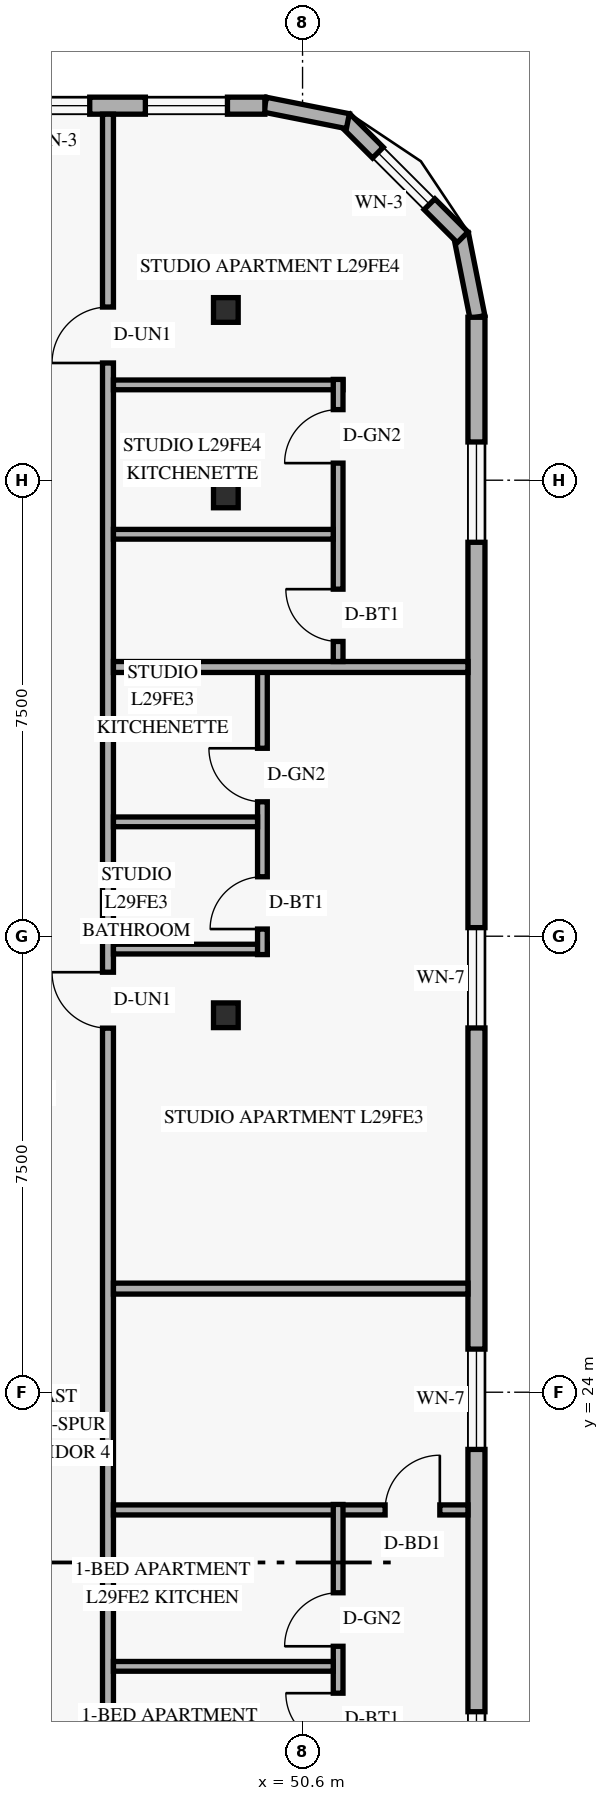
"""IFC4 building model, lengths in metres.
Left out: names, types, materials, properties, quantities, classifications, styles, units other than length and angle.
Written with IfcOpenShell. Run it as: python <this file> out.ifc"""

import sys

from ifc_helpers import new_model, si_unit, direction, frame, frame_2d, origin, origin_2d, place, context, subcontext, project, spatial, rectangle, hollow_rectangle, extrude, element, fill, save


model = new_model("IFC4")
c1 = context("Model", 3, precision=1e-05, world=origin(), true_north=direction((0.0, 1.0)))
c2 = subcontext(c1, "Body", "Model", "MODEL_VIEW")
j1 = project(units=[si_unit("LENGTHUNIT", "METRE"), si_unit("PLANEANGLEUNIT", "RADIAN")], contexts=[c1])
p1 = place(None, origin())
s1 = spatial("IfcSite", under=j1, at=p1, CompositionType="ELEMENT")
p2 = place(p1, origin())
s2 = spatial("IfcBuilding", under=s1, at=p2, CompositionType="ELEMENT")
p3 = place(p2, frame((0.0, 0.0, 113.4)))
s3 = spatial("IfcBuildingStorey", under=s2, at=p3, CompositionType="ELEMENT", Elevation=113.4)
for number, where, z_axis, x_axis in (
    (1, (49.234, 30.2, 0.0), (0.058, 0.0, 0.998), (0.0, 1.0, 0.0)),
    (2, (49.234, 38.75, 0.0), (0.058, 0.0, 0.998), (0.0, 1.0, 0.0)),
    (3, (49.234, 41.8, 0.0), (0.058, 0.0, 0.998), (0.0, 1.0, 0.0)),
):
    element("IfcColumn", number, at=place(p3, frame(where, z_axis=z_axis, x_axis=x_axis)), inside=s3, PredefinedType="COLUMN", context=c2, shape_type="SweptSolid", body=[
        extrude(hollow_rectangle(XDim=0.406, YDim=0.406, WallThickness=0.016, at=origin_2d()), origin(), (0.0, 0.0, 1.0), 3.606),
    ])
p4 = place(p3, frame((53.476, 41.684, 0.0), z_axis=(0.0, 0.0, 1.0), x_axis=(-0.195000137217, 0.980803214965, 0.0)))
e4 = element("IfcWall", 4, at=p4, inside=s3, PredefinedType="SOLIDWALL", context=c2, shape_type="SweptSolid", body=[
    extrude(rectangle(XDim=1.388, YDim=0.25, at=frame_2d((0.694, 0.0))), origin(), (0.0, 0.0, 1.0), 3.35),
])
p5 = place(p3, frame((53.232, 42.995, 0.0), z_axis=(0.0, 0.0, 1.0), x_axis=(-0.707151344399, 0.707062215165, 0.0)))
e5 = element("IfcWall", 5, at=p5, inside=s3, PredefinedType="SOLIDWALL", context=c2, shape_type="SweptSolid", body=[
    extrude(rectangle(XDim=2.739, YDim=0.25, at=frame_2d((1.37, 0.0))), origin(), (0.0, 0.0, 1.0), 3.35),
])
p6 = place(p5, frame((0.77, 0.0, 0.85)))
e6 = element("IfcOpeningElement", 6, at=p6, cuts=e5, PredefinedType="OPENING", context=c2, shape_type="SweptSolid", body=[
    extrude(rectangle(XDim=1.2, YDim=1.5, at=frame_2d((0.6, 0.75))), frame((0.0, 0.135, 0.0), z_axis=(0.0, -1.0, 0.0), x_axis=(1.0, 0.0, 0.0)), (0.0, 0.0, 1.0), 0.27),
])
p7 = place(p3, frame((51.345, 44.905, 0.0), z_axis=(0.0, 0.0, 1.0), x_axis=(-0.980809899341, 0.19496651342, 0.0)))
e7 = element("IfcWall", 7, at=p7, inside=s3, PredefinedType="SOLIDWALL", context=c2, shape_type="SweptSolid", body=[
    extrude(rectangle(XDim=1.389, YDim=0.25, at=frame_2d((0.694, 0.0))), origin(), (0.0, 0.0, 1.0), 3.35),
])
p8 = place(p3, frame((53.46, 6.32, 0.0), z_axis=(0.0, 0.0, 1.0), x_axis=(0.0, 1.0, 0.0)))
e8 = element("IfcWall", 8, at=p8, inside=s3, PredefinedType="SOLIDWALL", context=c2, shape_type="SweptSolid", body=[
    extrude(rectangle(XDim=35.36, YDim=0.28, at=frame_2d((17.68, 0.0))), origin(), (0.0, 0.0, 1.0), 3.35),
])
p9 = place(p8, frame((2.903, 0.0, 0.85)))
e9 = element("IfcOpeningElement", 9, at=p9, cuts=e8, PredefinedType="OPENING", context=c2, shape_type="SweptSolid", body=[
    extrude(rectangle(XDim=1.65, YDim=1.6, at=frame_2d((0.825, 0.8))), frame((0.0, 0.15, 0.0), z_axis=(0.0, -1.0, 0.0), x_axis=(1.0, 0.0, 0.0)), (0.0, 0.0, 1.0), 0.3),
])
p10 = place(p8, frame((10.775, 0.0, 0.85)))
e10 = element("IfcOpeningElement", 10, at=p10, cuts=e8, PredefinedType="OPENING", context=c2, shape_type="SweptSolid", body=[
    extrude(rectangle(XDim=1.65, YDim=1.6, at=frame_2d((0.825, 0.8))), frame((0.0, 0.15, 0.0), z_axis=(0.0, -1.0, 0.0), x_axis=(1.0, 0.0, 0.0)), (0.0, 0.0, 1.0), 0.3),
])
p11 = place(p8, frame((16.739, 0.0, 0.85)))
e11 = element("IfcOpeningElement", 11, at=p11, cuts=e8, PredefinedType="OPENING", context=c2, shape_type="SweptSolid", body=[
    extrude(rectangle(XDim=1.65, YDim=1.6, at=frame_2d((0.825, 0.8))), frame((0.0, 0.15, 0.0), z_axis=(0.0, -1.0, 0.0), x_axis=(1.0, 0.0, 0.0)), (0.0, 0.0, 1.0), 0.3),
])
p12 = place(p8, frame((23.671, 0.0, 0.85)))
e12 = element("IfcOpeningElement", 12, at=p12, cuts=e8, PredefinedType="OPENING", context=c2, shape_type="SweptSolid", body=[
    extrude(rectangle(XDim=1.65, YDim=1.6, at=frame_2d((0.825, 0.8))), frame((0.0, 0.15, 0.0), z_axis=(0.0, -1.0, 0.0), x_axis=(1.0, 0.0, 0.0)), (0.0, 0.0, 1.0), 0.3),
])
p13 = place(p8, frame((31.659, 0.0, 0.85)))
e13 = element("IfcOpeningElement", 13, at=p13, cuts=e8, PredefinedType="OPENING", context=c2, shape_type="SweptSolid", body=[
    extrude(rectangle(XDim=1.65, YDim=1.6, at=frame_2d((0.825, 0.8))), frame((0.0, 0.15, 0.0), z_axis=(0.0, -1.0, 0.0), x_axis=(1.0, 0.0, 0.0)), (0.0, 0.0, 1.0), 0.3),
])
p14 = place(p3, frame((49.98, 45.16, 0.0), z_axis=(0.0, 0.0, 1.0), x_axis=(-1.0, 0.0, 0.0)))
e14 = element("IfcWall", 14, at=p14, inside=s3, PredefinedType="SOLIDWALL", context=c2, shape_type="SweptSolid", body=[
    extrude(rectangle(XDim=36.56, YDim=0.28, at=frame_2d((18.28, 0.0))), origin(), (0.0, 0.0, 1.0), 3.35),
])
p15 = place(p14, frame((31.77, 0.0, 0.85)))
e15 = element("IfcOpeningElement", 15, at=p15, cuts=e14, PredefinedType="OPENING", context=c2, shape_type="SweptSolid", body=[
    extrude(rectangle(XDim=1.35, YDim=1.55, at=frame_2d((0.675, 0.775))), frame((0.0, 0.15, 0.0), z_axis=(0.0, -1.0, 0.0), x_axis=(1.0, 0.0, 0.0)), (0.0, 0.0, 1.0), 0.3),
])
p16 = place(p14, frame((23.28, 0.0, 0.85)))
e16 = element("IfcOpeningElement", 16, at=p16, cuts=e14, PredefinedType="OPENING", context=c2, shape_type="SweptSolid", body=[
    extrude(rectangle(XDim=1.35, YDim=1.55, at=frame_2d((0.675, 0.775))), frame((0.0, 0.15, 0.0), z_axis=(0.0, -1.0, 0.0), x_axis=(1.0, 0.0, 0.0)), (0.0, 0.0, 1.0), 0.3),
])
p17 = place(p14, frame((16.395, 0.0, 0.85)))
e17 = element("IfcOpeningElement", 17, at=p17, cuts=e14, PredefinedType="OPENING", context=c2, shape_type="SweptSolid", body=[
    extrude(rectangle(XDim=1.35, YDim=1.55, at=frame_2d((0.675, 0.775))), frame((0.0, 0.15, 0.0), z_axis=(0.0, -1.0, 0.0), x_axis=(1.0, 0.0, 0.0)), (0.0, 0.0, 1.0), 0.3),
])
p18 = place(p14, frame((10.79, 0.0, 0.85)))
e18 = element("IfcOpeningElement", 18, at=p18, cuts=e14, PredefinedType="OPENING", context=c2, shape_type="SweptSolid", body=[
    extrude(rectangle(XDim=1.35, YDim=1.55, at=frame_2d((0.675, 0.775))), frame((0.0, 0.15, 0.0), z_axis=(0.0, -1.0, 0.0), x_axis=(1.0, 0.0, 0.0)), (0.0, 0.0, 1.0), 0.3),
])
p19 = place(p14, frame((5.7, 0.0, 0.85)))
e19 = element("IfcOpeningElement", 19, at=p19, cuts=e14, PredefinedType="OPENING", context=c2, shape_type="SweptSolid", body=[
    extrude(rectangle(XDim=1.35, YDim=1.55, at=frame_2d((0.675, 0.775))), frame((0.0, 0.15, 0.0), z_axis=(0.0, -1.0, 0.0), x_axis=(1.0, 0.0, 0.0)), (0.0, 0.0, 1.0), 0.3),
])
p20 = place(p14, frame((2.88, 0.0, 0.85)))
e20 = element("IfcOpeningElement", 20, at=p20, cuts=e14, PredefinedType="OPENING", context=c2, shape_type="SweptSolid", body=[
    extrude(rectangle(XDim=1.2, YDim=1.5, at=frame_2d((0.6, 0.75))), frame((0.0, 0.15, 0.0), z_axis=(0.0, -1.0, 0.0), x_axis=(1.0, 0.0, 0.0)), (0.0, 0.0, 1.0), 0.3),
])
p21 = place(p14, frame((0.615, 0.0, 0.85)))
e21 = element("IfcOpeningElement", 21, at=p21, cuts=e14, PredefinedType="OPENING", context=c2, shape_type="SweptSolid", body=[
    extrude(rectangle(XDim=1.35, YDim=1.55, at=frame_2d((0.675, 0.775))), frame((0.0, 0.15, 0.0), z_axis=(0.0, -1.0, 0.0), x_axis=(1.0, 0.0, 0.0)), (0.0, 0.0, 1.0), 0.3),
])
p22 = place(p3, frame((47.4, 2.98, 0.0), z_axis=(0.0, 0.0, 1.0), x_axis=(0.0, 1.0, 0.0)))
e22 = element("IfcWall", 22, at=p22, inside=s3, PredefinedType="STANDARD", context=c2, shape_type="SweptSolid", body=[
    extrude(rectangle(XDim=42.04, YDim=0.18, at=frame_2d((21.02, 0.0))), origin(), (0.0, 0.0, 1.0), 2.721),
])
p23 = place(p22, frame((4.856, 0.0, 0.0)))
e23 = element("IfcOpeningElement", 23, at=p23, cuts=e22, PredefinedType="OPENING", context=c2, shape_type="SweptSolid", body=[
    extrude(rectangle(XDim=0.92, YDim=2.15, at=frame_2d((0.46, 1.075))), frame((0.0, 0.1, 0.0), z_axis=(0.0, -1.0, 0.0), x_axis=(1.0, 0.0, 0.0)), (0.0, 0.0, 1.0), 0.2),
])
p24 = place(p22, frame((13.02, 0.0, 0.0)))
e24 = element("IfcOpeningElement", 24, at=p24, cuts=e22, PredefinedType="OPENING", context=c2, shape_type="SweptSolid", body=[
    extrude(rectangle(XDim=0.92, YDim=2.15, at=frame_2d((0.46, 1.075))), frame((0.0, 0.1, 0.0), z_axis=(0.0, -1.0, 0.0), x_axis=(1.0, 0.0, 0.0)), (0.0, 0.0, 1.0), 0.2),
])
p25 = place(p22, frame((27.008, 0.0, 0.0)))
e25 = element("IfcOpeningElement", 25, at=p25, cuts=e22, PredefinedType="OPENING", context=c2, shape_type="SweptSolid", body=[
    extrude(rectangle(XDim=0.92, YDim=2.15, at=frame_2d((0.46, 1.075))), frame((0.0, 0.1, 0.0), z_axis=(0.0, -1.0, 0.0), x_axis=(1.0, 0.0, 0.0)), (0.0, 0.0, 1.0), 0.2),
])
p26 = place(p22, frame((37.948, 0.0, 0.0)))
e26 = element("IfcOpeningElement", 26, at=p26, cuts=e22, PredefinedType="OPENING", context=c2, shape_type="SweptSolid", body=[
    extrude(rectangle(XDim=0.92, YDim=2.15, at=frame_2d((0.46, 1.075))), frame((0.0, 0.1, 0.0), z_axis=(0.0, -1.0, 0.0), x_axis=(1.0, 0.0, 0.0)), (0.0, 0.0, 1.0), 0.2),
])
p27 = place(p3, frame((47.49, 22.064, 0.0), z_axis=(0.0, 0.0, 1.0), x_axis=(1.0, 0.0, 0.0)))
e27 = element("IfcWall", 27, at=p27, inside=s3, PredefinedType="PARTITIONING", context=c2, shape_type="SweptSolid", body=[
    extrude(rectangle(XDim=5.83, YDim=0.165, at=frame_2d((2.915, 0.0))), origin(), (0.0, 0.0, 1.0), 2.799),
])
p28 = place(p27, frame((4.468, 0.0, 0.0)))
e28 = element("IfcOpeningElement", 28, at=p28, cuts=e27, PredefinedType="OPENING", context=c2, shape_type="SweptSolid", body=[
    extrude(rectangle(XDim=0.9, YDim=2.14, at=frame_2d((0.45, 1.07))), frame((0.0, 0.093, 0.0), z_axis=(0.0, -1.0, 0.0), x_axis=(1.0, 0.0, 0.0)), (0.0, 0.0, 1.0), 0.185),
])
p29 = place(p3, frame((51.185, 17.21, 0.0), z_axis=(0.0, 0.0, 1.0), x_axis=(0.0, 1.0, 0.0)))
e29 = element("IfcWall", 29, at=p29, inside=s3, PredefinedType="PLUMBINGWALL", context=c2, shape_type="SweptSolid", body=[
    extrude(rectangle(XDim=4.944, YDim=0.16, at=frame_2d((2.472, 0.0))), origin(), (0.0, 0.0, 1.0), 3.35),
])
p30 = place(p29, frame((0.98, 0.0, 0.0)))
e30 = element("IfcOpeningElement", 30, at=p30, cuts=e29, PredefinedType="OPENING", context=c2, shape_type="SweptSolid", body=[
    extrude(rectangle(XDim=0.86, YDim=2.12, at=frame_2d((0.43, 1.06))), frame((0.0, 0.09, 0.0), z_axis=(0.0, -1.0, 0.0), x_axis=(1.0, 0.0, 0.0)), (0.0, 0.0, 1.0), 0.18),
])
p31 = place(p29, frame((2.611, 0.0, 0.0)))
e31 = element("IfcOpeningElement", 31, at=p31, cuts=e29, PredefinedType="OPENING", context=c2, shape_type="SweptSolid", body=[
    extrude(rectangle(XDim=0.88, YDim=2.12, at=frame_2d((0.44, 1.06))), frame((0.0, 0.09, 0.0), z_axis=(0.0, -1.0, 0.0), x_axis=(1.0, 0.0, 0.0)), (0.0, 0.0, 1.0), 0.18),
])
p32 = place(p3, frame((47.49, 19.491, 0.0), z_axis=(0.0, 0.0, 1.0), x_axis=(1.0, 0.0, 0.0)))
e32 = element("IfcWall", 32, at=p32, inside=s3, PredefinedType="PLUMBINGWALL", context=c2, shape_type="SweptSolid", body=[
    extrude(rectangle(XDim=3.615, YDim=0.16, at=frame_2d((1.808, 0.0))), origin(), (0.0, 0.0, 1.0), 2.799),
])
p33 = place(p3, frame((47.49, 25.704, 0.0), z_axis=(0.0, 0.0, 1.0), x_axis=(1.0, 0.0, 0.0)))
e33 = element("IfcWall", 33, at=p33, inside=s3, PredefinedType="PARTITIONING", context=c2, shape_type="SweptSolid", body=[
    extrude(rectangle(XDim=5.83, YDim=0.18, at=frame_2d((2.915, 0.0))), origin(), (0.0, 0.0, 1.0), 2.799),
])
p34 = place(p3, frame((47.49, 31.288, 0.0), z_axis=(0.0, 0.0, 1.0), x_axis=(1.0, 0.0, 0.0)))
e34 = element("IfcWall", 34, at=p34, inside=s3, PredefinedType="PLUMBINGWALL", context=c2, shape_type="SweptSolid", body=[
    extrude(rectangle(XDim=2.53, YDim=0.16, at=frame_2d((1.265, 0.0))), origin(), (0.0, 0.0, 1.0), 2.799),
])
p35 = place(p3, frame((49.94, 31.198, 0.0), z_axis=(0.0, 0.0, 1.0), x_axis=(0.0, 1.0, 0.0)))
e35 = element("IfcWall", 35, at=p35, inside=s3, PredefinedType="PLUMBINGWALL", context=c2, shape_type="SweptSolid", body=[
    extrude(rectangle(XDim=4.73, YDim=0.16, at=frame_2d((2.365, 0.0))), origin(), (0.0, 0.0, 1.0), 3.35),
])
p36 = place(p35, frame((0.42, 0.0, 0.0)))
e36 = element("IfcOpeningElement", 36, at=p36, cuts=e35, PredefinedType="OPENING", context=c2, shape_type="SweptSolid", body=[
    extrude(rectangle(XDim=0.86, YDim=2.12, at=frame_2d((0.43, 1.06))), frame((0.0, 0.09, 0.0), z_axis=(0.0, -1.0, 0.0), x_axis=(1.0, 0.0, 0.0)), (0.0, 0.0, 1.0), 0.18),
])
p37 = place(p35, frame((2.513, 0.0, 0.0)))
e37 = element("IfcOpeningElement", 37, at=p37, cuts=e35, PredefinedType="OPENING", context=c2, shape_type="SweptSolid", body=[
    extrude(rectangle(XDim=0.88, YDim=2.12, at=frame_2d((0.44, 1.06))), frame((0.0, 0.09, 0.0), z_axis=(0.0, -1.0, 0.0), x_axis=(1.0, 0.0, 0.0)), (0.0, 0.0, 1.0), 0.18),
])
p38 = place(p3, frame((47.49, 33.381, 0.0), z_axis=(0.0, 0.0, 1.0), x_axis=(1.0, 0.0, 0.0)))
e38 = element("IfcWall", 38, at=p38, inside=s3, PredefinedType="PLUMBINGWALL", context=c2, shape_type="SweptSolid", body=[
    extrude(rectangle(XDim=2.37, YDim=0.16, at=frame_2d((1.185, 0.0))), origin(), (0.0, 0.0, 1.0), 2.799),
])
p39 = place(p3, frame((47.49, 35.928, 0.0), z_axis=(0.0, 0.0, 1.0), x_axis=(1.0, 0.0, 0.0)))
e39 = element("IfcWall", 39, at=p39, inside=s3, PredefinedType="PARTITIONING", context=c2, shape_type="SweptSolid", body=[
    extrude(rectangle(XDim=5.83, YDim=0.18, at=frame_2d((2.915, 0.0))), origin(), (0.0, 0.0, 1.0), 2.799),
])
p40 = place(p3, frame((47.49, 40.568, 0.0), z_axis=(0.0, 0.0, 1.0), x_axis=(1.0, 0.0, 0.0)))
e40 = element("IfcWall", 40, at=p40, inside=s3, PredefinedType="PLUMBINGWALL", context=c2, shape_type="SweptSolid", body=[
    extrude(rectangle(XDim=3.775, YDim=0.16, at=frame_2d((1.888, 0.0))), origin(), (0.0, 0.0, 1.0), 2.799),
])
p41 = place(p3, frame((51.185, 36.018, 0.0), z_axis=(0.0, 0.0, 1.0), x_axis=(0.0, 1.0, 0.0)))
e41 = element("IfcWall", 41, at=p41, inside=s3, PredefinedType="PLUMBINGWALL", context=c2, shape_type="SweptSolid", body=[
    extrude(rectangle(XDim=4.64, YDim=0.16, at=frame_2d((2.32, 0.0))), origin(), (0.0, 0.0, 1.0), 3.35),
])
p42 = place(p41, frame((0.33, 0.0, 0.0)))
e42 = element("IfcOpeningElement", 42, at=p42, cuts=e41, PredefinedType="OPENING", context=c2, shape_type="SweptSolid", body=[
    extrude(rectangle(XDim=0.86, YDim=2.12, at=frame_2d((0.43, 1.06))), frame((0.0, 0.09, 0.0), z_axis=(0.0, -1.0, 0.0), x_axis=(1.0, 0.0, 0.0)), (0.0, 0.0, 1.0), 0.18),
])
p43 = place(p41, frame((3.263, 0.0, 0.0)))
e43 = element("IfcOpeningElement", 43, at=p43, cuts=e41, PredefinedType="OPENING", context=c2, shape_type="SweptSolid", body=[
    extrude(rectangle(XDim=0.88, YDim=2.12, at=frame_2d((0.44, 1.06))), frame((0.0, 0.09, 0.0), z_axis=(0.0, -1.0, 0.0), x_axis=(1.0, 0.0, 0.0)), (0.0, 0.0, 1.0), 0.18),
])
p44 = place(p3, frame((47.49, 38.111, 0.0), z_axis=(0.0, 0.0, 1.0), x_axis=(1.0, 0.0, 0.0)))
e44 = element("IfcWall", 44, at=p44, inside=s3, PredefinedType="PLUMBINGWALL", context=c2, shape_type="SweptSolid", body=[
    extrude(rectangle(XDim=3.615, YDim=0.16, at=frame_2d((1.808, 0.0))), origin(), (0.0, 0.0, 1.0), 2.799),
])
p45 = place(p6, origin())
e45 = element("IfcWindow", 45, at=p45, inside=s3, PartitioningType="SINGLE_PANEL", PredefinedType="WINDOW", context=c2, shape_type="SweptSolid", body=[
    extrude(rectangle(XDim=1.2, YDim=1.5, at=frame_2d((0.6, 0.75))), frame((0.0, 0.03, 0.0), z_axis=(0.0, -1.0, 0.0), x_axis=(1.0, 0.0, 0.0)), (0.0, 0.0, 1.0), 0.06),
])
fill(e6, e45)
p46 = place(p10, origin())
e46 = element("IfcWindow", 46, at=p46, inside=s3, PartitioningType="SINGLE_PANEL", PredefinedType="WINDOW", context=c2, shape_type="SweptSolid", body=[
    extrude(rectangle(XDim=1.65, YDim=1.6, at=frame_2d((0.825, 0.8))), frame((0.0, 0.03, 0.0), z_axis=(0.0, -1.0, 0.0), x_axis=(1.0, 0.0, 0.0)), (0.0, 0.0, 1.0), 0.06),
])
fill(e10, e46)
p47 = place(p11, origin())
e47 = element("IfcWindow", 47, at=p47, inside=s3, PartitioningType="SINGLE_PANEL", PredefinedType="WINDOW", context=c2, shape_type="SweptSolid", body=[
    extrude(rectangle(XDim=1.65, YDim=1.6, at=frame_2d((0.825, 0.8))), frame((0.0, 0.03, 0.0), z_axis=(0.0, -1.0, 0.0), x_axis=(1.0, 0.0, 0.0)), (0.0, 0.0, 1.0), 0.06),
])
fill(e11, e47)
p48 = place(p12, origin())
e48 = element("IfcWindow", 48, at=p48, inside=s3, PartitioningType="SINGLE_PANEL", PredefinedType="WINDOW", context=c2, shape_type="SweptSolid", body=[
    extrude(rectangle(XDim=1.65, YDim=1.6, at=frame_2d((0.825, 0.8))), frame((0.0, 0.03, 0.0), z_axis=(0.0, -1.0, 0.0), x_axis=(1.0, 0.0, 0.0)), (0.0, 0.0, 1.0), 0.06),
])
fill(e12, e48)
p49 = place(p13, origin())
e49 = element("IfcWindow", 49, at=p49, inside=s3, PartitioningType="SINGLE_PANEL", PredefinedType="WINDOW", context=c2, shape_type="SweptSolid", body=[
    extrude(rectangle(XDim=1.65, YDim=1.6, at=frame_2d((0.825, 0.8))), frame((0.0, 0.03, 0.0), z_axis=(0.0, -1.0, 0.0), x_axis=(1.0, 0.0, 0.0)), (0.0, 0.0, 1.0), 0.06),
])
fill(e13, e49)
p50 = place(p20, origin())
e50 = element("IfcWindow", 50, at=p50, inside=s3, PartitioningType="SINGLE_PANEL", PredefinedType="WINDOW", context=c2, shape_type="SweptSolid", body=[
    extrude(rectangle(XDim=1.2, YDim=1.5, at=frame_2d((0.6, 0.75))), frame((0.0, 0.03, 0.0), z_axis=(0.0, -1.0, 0.0), x_axis=(1.0, 0.0, 0.0)), (0.0, 0.0, 1.0), 0.06),
])
fill(e20, e50)
p51 = place(p21, origin())
e51 = element("IfcWindow", 51, at=p51, inside=s3, PartitioningType="SINGLE_PANEL", PredefinedType="WINDOW", context=c2, shape_type="SweptSolid", body=[
    extrude(rectangle(XDim=1.35, YDim=1.55, at=frame_2d((0.675, 0.775))), frame((0.0, 0.03, 0.0), z_axis=(0.0, -1.0, 0.0), x_axis=(1.0, 0.0, 0.0)), (0.0, 0.0, 1.0), 0.06),
])
fill(e21, e51)
p52 = place(p30, origin())
e52 = element("IfcDoor", 52, at=p52, inside=s3, OperationType="SINGLE_SWING_RIGHT", PredefinedType="DOOR", context=c2, shape_type="SweptSolid", body=[
    extrude(rectangle(XDim=0.86, YDim=2.12, at=frame_2d((0.43, 1.06))), frame((0.0, 0.025, 0.0), z_axis=(0.0, -1.0, 0.0), x_axis=(1.0, 0.0, 0.0)), (0.0, 0.0, 1.0), 0.05),
])
fill(e30, e52)
p53 = place(p31, origin())
e53 = element("IfcDoor", 53, at=p53, inside=s3, OperationType="SINGLE_SWING_LEFT", PredefinedType="DOOR", context=c2, shape_type="SweptSolid", body=[
    extrude(rectangle(XDim=0.88, YDim=2.12, at=frame_2d((0.44, 1.06))), frame((0.0, 0.025, 0.0), z_axis=(0.0, -1.0, 0.0), x_axis=(1.0, 0.0, 0.0)), (0.0, 0.0, 1.0), 0.05),
])
fill(e31, e53)
p54 = place(p28, origin())
e54 = element("IfcDoor", 54, at=p54, inside=s3, OperationType="SINGLE_SWING_RIGHT", PredefinedType="DOOR", context=c2, shape_type="SweptSolid", body=[
    extrude(rectangle(XDim=0.9, YDim=2.14, at=frame_2d((0.45, 1.07))), frame((0.0, 0.025, 0.0), z_axis=(0.0, -1.0, 0.0), x_axis=(1.0, 0.0, 0.0)), (0.0, 0.0, 1.0), 0.05),
])
fill(e28, e54)
p55 = place(p25, origin())
e55 = element("IfcDoor", 55, at=p55, inside=s3, OperationType="SINGLE_SWING_RIGHT", PredefinedType="DOOR", context=c2, shape_type="SweptSolid", body=[
    extrude(rectangle(XDim=0.92, YDim=2.15, at=frame_2d((0.46, 1.075))), frame((0.0, 0.025, 0.0), z_axis=(0.0, -1.0, 0.0), x_axis=(1.0, 0.0, 0.0)), (0.0, 0.0, 1.0), 0.05),
])
fill(e25, e55)
p56 = place(p36, origin())
e56 = element("IfcDoor", 56, at=p56, inside=s3, OperationType="SINGLE_SWING_LEFT", PredefinedType="DOOR", context=c2, shape_type="SweptSolid", body=[
    extrude(rectangle(XDim=0.86, YDim=2.12, at=frame_2d((0.43, 1.06))), frame((0.0, 0.025, 0.0), z_axis=(0.0, -1.0, 0.0), x_axis=(1.0, 0.0, 0.0)), (0.0, 0.0, 1.0), 0.05),
])
fill(e36, e56)
p57 = place(p37, origin())
e57 = element("IfcDoor", 57, at=p57, inside=s3, OperationType="SINGLE_SWING_RIGHT", PredefinedType="DOOR", context=c2, shape_type="SweptSolid", body=[
    extrude(rectangle(XDim=0.88, YDim=2.12, at=frame_2d((0.44, 1.06))), frame((0.0, 0.025, 0.0), z_axis=(0.0, -1.0, 0.0), x_axis=(1.0, 0.0, 0.0)), (0.0, 0.0, 1.0), 0.05),
])
fill(e37, e57)
p58 = place(p26, origin())
e58 = element("IfcDoor", 58, at=p58, inside=s3, OperationType="SINGLE_SWING_LEFT", PredefinedType="DOOR", context=c2, shape_type="SweptSolid", body=[
    extrude(rectangle(XDim=0.92, YDim=2.15, at=frame_2d((0.46, 1.075))), frame((0.0, 0.025, 0.0), z_axis=(0.0, -1.0, 0.0), x_axis=(1.0, 0.0, 0.0)), (0.0, 0.0, 1.0), 0.05),
])
fill(e26, e58)
p59 = place(p42, origin())
e59 = element("IfcDoor", 59, at=p59, inside=s3, OperationType="SINGLE_SWING_RIGHT", PredefinedType="DOOR", context=c2, shape_type="SweptSolid", body=[
    extrude(rectangle(XDim=0.86, YDim=2.12, at=frame_2d((0.43, 1.06))), frame((0.0, 0.025, 0.0), z_axis=(0.0, -1.0, 0.0), x_axis=(1.0, 0.0, 0.0)), (0.0, 0.0, 1.0), 0.05),
])
fill(e42, e59)
p60 = place(p43, origin())
e60 = element("IfcDoor", 60, at=p60, inside=s3, OperationType="SINGLE_SWING_LEFT", PredefinedType="DOOR", context=c2, shape_type="SweptSolid", body=[
    extrude(rectangle(XDim=0.88, YDim=2.12, at=frame_2d((0.44, 1.06))), frame((0.0, 0.025, 0.0), z_axis=(0.0, -1.0, 0.0), x_axis=(1.0, 0.0, 0.0)), (0.0, 0.0, 1.0), 0.05),
])
fill(e43, e60)
save(model, sys.argv[1])
